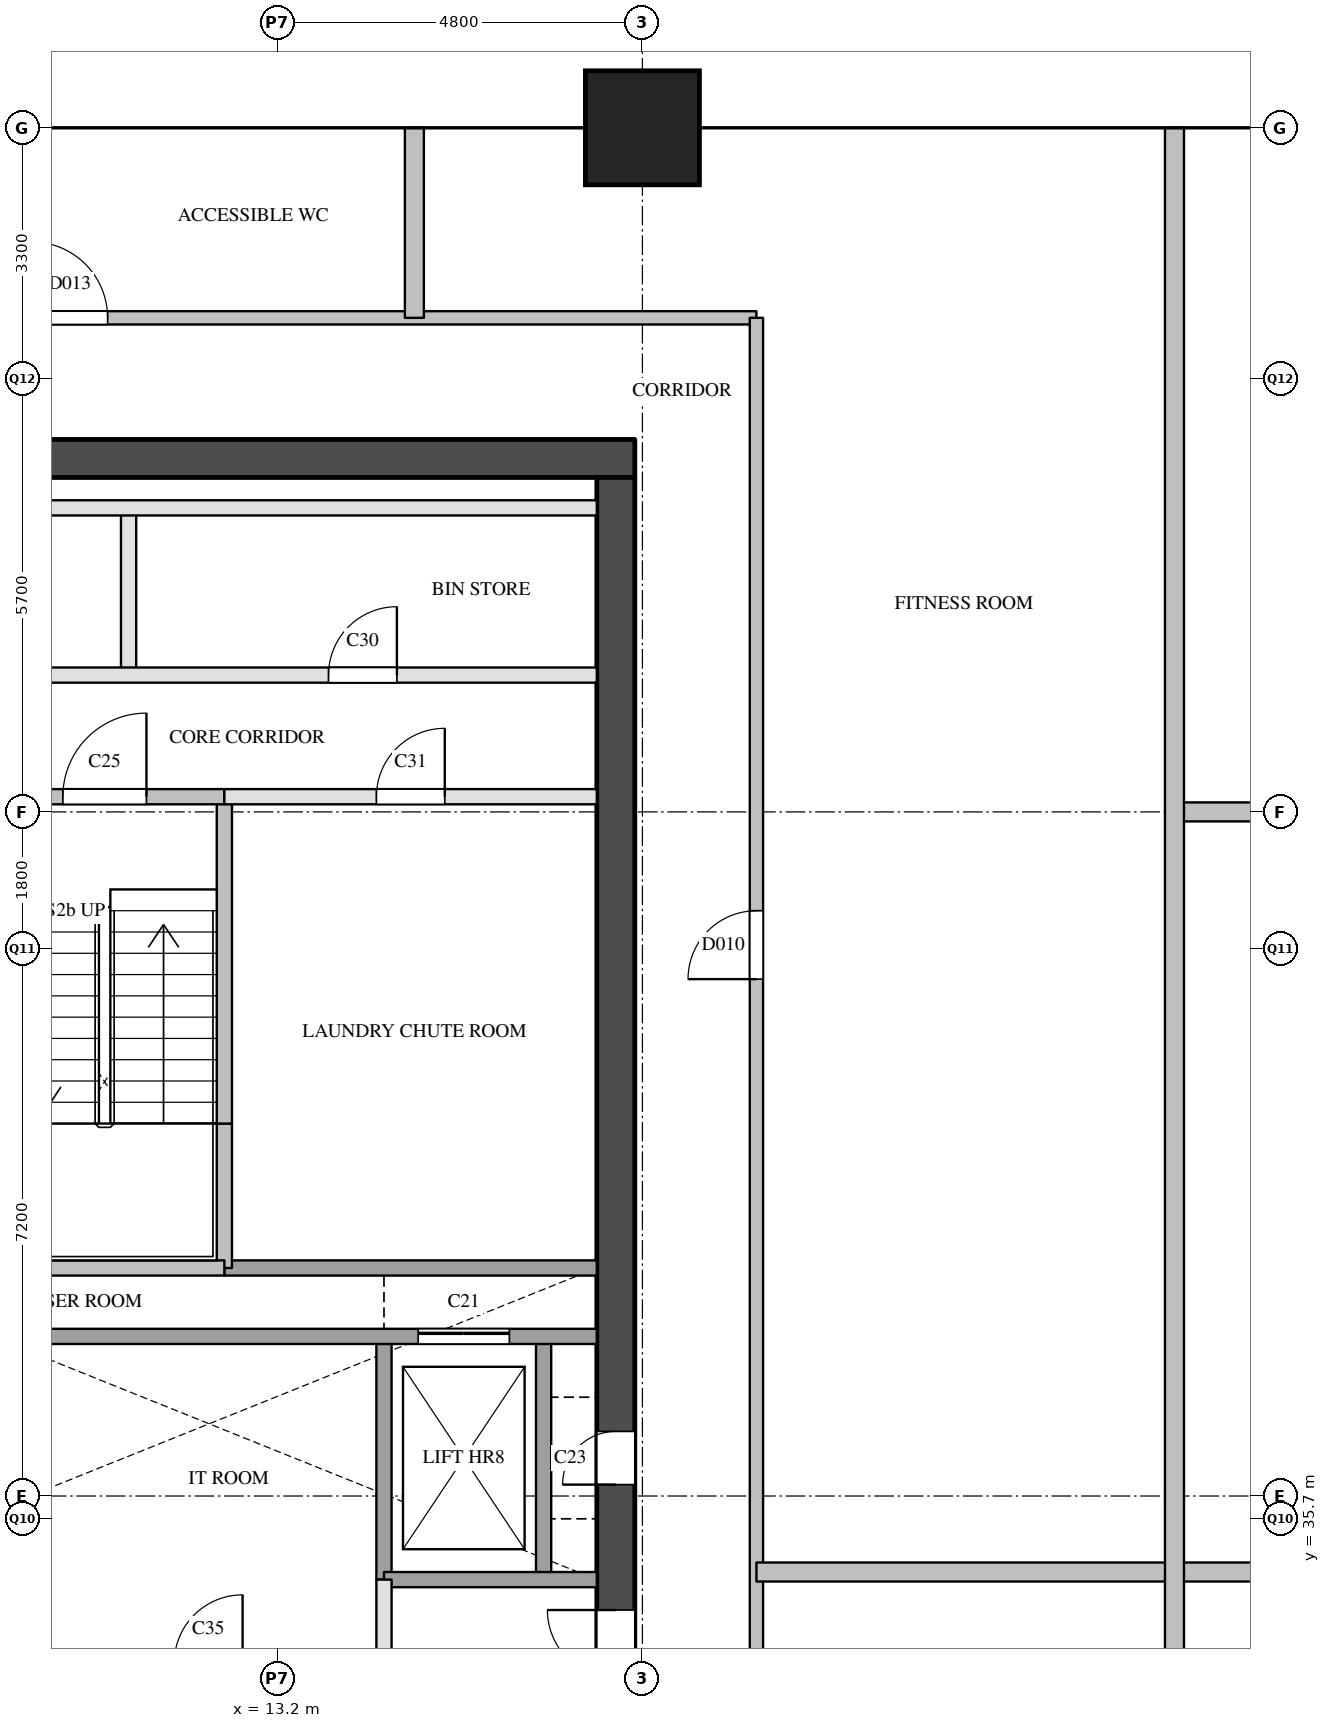
"""IFC4 building model, lengths in metres.
Left out: names, types, materials, properties, quantities, classifications, styles, units other than length and angle.
Written with IfcOpenShell. Run it as: python <this file> out.ifc"""

import sys

from ifc_helpers import new_model, si_unit, direction, frame, frame_2d, origin, origin_2d, place, context, subcontext, project, spatial, rectangle, extrude, element, fill, save


model = new_model("IFC4")
c1 = context("Model", 3, precision=1e-05, world=origin(), true_north=direction((0.0, 1.0)))
c2 = subcontext(c1, "Body", "Model", "MODEL_VIEW")
j1 = project(units=[si_unit("LENGTHUNIT", "METRE"), si_unit("PLANEANGLEUNIT", "RADIAN")], contexts=[c1])
p1 = place(None, origin())
s1 = spatial("IfcSite", under=j1, at=p1, CompositionType="ELEMENT")
p2 = place(p1, origin())
s2 = spatial("IfcBuilding", under=s1, at=p2, CompositionType="ELEMENT")
p3 = place(p2, frame((0.0, 0.0, 177.8)))
s3 = spatial("IfcBuildingStorey", under=s2, at=p3, CompositionType="ELEMENT", Elevation=177.8)
p4 = place(p3, frame((18.0, 54.0, 0.0), z_axis=(0.0, 0.0, 1.0), x_axis=(1.0, 0.0, 0.0)))
e1 = element("IfcColumn", 1, at=p4, inside=s3, PredefinedType="COLUMN", context=c2, shape_type="SweptSolid", body=[
    extrude(rectangle(XDim=1.5, YDim=1.5, at=origin_2d()), origin(), (0.0, 0.0, 1.0), 3.9),
])
p5 = place(p3, frame((5.7, 49.65, 0.0), z_axis=(0.0, 0.0, 1.0), x_axis=(1.0, 0.0, 0.0)))
e2 = element("IfcWall", 2, at=p5, inside=s3, PredefinedType="SHEAR", context=c2, shape_type="SweptSolid", body=[
    extrude(rectangle(XDim=12.2, YDim=0.5, at=frame_2d((6.1, 0.0))), origin(), (0.0, 0.0, 1.0), 3.6),
])
p6 = place(p3, frame((17.65, 29.1, 0.0), z_axis=(0.0, 0.0, 1.0), x_axis=(0.0, 1.0, 0.0)))
e3 = element("IfcWall", 3, at=p6, inside=s3, PredefinedType="SHEAR", context=c2, shape_type="SweptSolid", body=[
    extrude(rectangle(XDim=20.3, YDim=0.5, at=frame_2d((10.15, 0.0))), origin(), (0.0, 0.0, 1.0), 3.6),
])
p7 = place(p6, frame((1.25, 0.0, 0.0)))
e4 = element("IfcOpeningElement", 4, at=p7, cuts=e3, PredefinedType="OPENING", context=c2, shape_type="SweptSolid", body=[
    extrude(rectangle(XDim=0.7, YDim=2.1, at=frame_2d((0.35, 1.05))), frame((0.0, 0.26, 0.0), z_axis=(0.0, -1.0, 0.0), x_axis=(1.0, 0.0, 0.0)), (0.0, 0.0, 1.0), 0.52),
])
p8 = place(p6, frame((7.05, 0.0, 0.0)))
e5 = element("IfcOpeningElement", 5, at=p8, cuts=e3, PredefinedType="OPENING", context=c2, shape_type="SweptSolid", body=[
    extrude(rectangle(XDim=0.7, YDim=2.1, at=frame_2d((0.35, 1.05))), frame((0.0, 0.26, 0.0), z_axis=(0.0, -1.0, 0.0), x_axis=(1.0, 0.0, 0.0)), (0.0, 0.0, 1.0), 0.52),
])
p9 = place(p6, frame((3.6, 0.0, 0.0)))
e6 = element("IfcOpeningElement", 6, at=p9, cuts=e3, PredefinedType="OPENING", context=c2, shape_type="SweptSolid", body=[
    extrude(rectangle(XDim=1.8, YDim=2.1, at=frame_2d((0.9, 1.05))), frame((0.0, 0.26, 0.0), z_axis=(0.0, -1.0, 0.0), x_axis=(1.0, 0.0, 0.0)), (0.0, 0.0, 1.0), 0.52),
])
p10 = place(p3, frame((11.24, 46.8, 0.0), z_axis=(0.0, 0.0, 1.0), x_axis=(0.0, 1.0, 0.0)))
e7 = element("IfcWall", 7, at=p10, inside=s3, PredefinedType="PARTITIONING", context=c2, shape_type="SweptSolid", body=[
    extrude(rectangle(XDim=2.2, YDim=0.2, at=frame_2d((1.1, 0.0))), origin(), (0.0, 0.0, 1.0), 3.6),
])
p11 = place(p3, frame((12.5, 39.0, 0.0), z_axis=(0.0, 0.0, 1.0), x_axis=(0.0, 1.0, 0.0)))
e8 = element("IfcWall", 8, at=p11, inside=s3, PredefinedType="SOLIDWALL", context=c2, shape_type="SweptSolid", body=[
    extrude(rectangle(XDim=1.9, YDim=0.2, at=frame_2d((0.95, 0.0))), origin(), (0.0, 0.0, 1.0), 3.6),
])
p12 = place(p3, frame((12.5, 40.9, 0.0), z_axis=(0.0, 0.0, 1.0), x_axis=(0.0, 1.0, 0.0)))
e9 = element("IfcWall", 9, at=p12, inside=s3, PredefinedType="SOLIDWALL", context=c2, shape_type="SweptSolid", body=[
    extrude(rectangle(XDim=4.3, YDim=0.2, at=frame_2d((2.15, 0.0))), origin(), (0.0, 0.0, 1.0), 3.6),
])
p13 = place(p3, frame((14.6, 32.3, 0.0), z_axis=(0.0, 0.0, 1.0), x_axis=(0.0, 1.0, 0.0)))
e10 = element("IfcWall", 10, at=p13, inside=s3, PredefinedType="PARTITIONING", context=c2, shape_type="SweptSolid", body=[
    extrude(rectangle(XDim=2.6, YDim=0.2, at=frame_2d((1.3, 0.0))), origin(), (0.0, 0.0, 1.0), 3.6),
])
for number, where, z_axis, x_axis in (
    (11, (14.6, 34.9, 0.0), (0.0, 0.0, 1.0), (0.0, 1.0, 0.0)),
    (12, (16.7, 34.9, 0.0), (0.0, 0.0, 1.0), (0.0, 1.0, 0.0)),
):
    element("IfcWall", number, at=place(p3, frame(where, z_axis=z_axis, x_axis=x_axis)), inside=s3, PredefinedType="SOLIDWALL", context=c2, shape_type="SweptSolid", body=[
        extrude(rectangle(XDim=3.2, YDim=0.2, at=frame_2d((1.6, 0.0))), origin(), (0.0, 0.0, 1.0), 3.6),
    ])
p14 = place(p3, frame((14.6, 34.9, 0.0), z_axis=(0.0, 0.0, 1.0), x_axis=(1.0, 0.0, 0.0)))
e13 = element("IfcWall", 13, at=p14, inside=s3, PredefinedType="SOLIDWALL", context=c2, shape_type="SweptSolid", body=[
    extrude(rectangle(XDim=2.8, YDim=0.2, at=frame_2d((1.4, 0.0))), origin(), (0.0, 0.0, 1.0), 3.6),
])
p15 = place(p3, frame((6.2, 38.1, 0.0), z_axis=(0.0, 0.0, 1.0), x_axis=(1.0, 0.0, 0.0)))
e14 = element("IfcWall", 14, at=p15, inside=s3, PredefinedType="SOLIDWALL", context=c2, shape_type="SweptSolid", body=[
    extrude(rectangle(XDim=11.2, YDim=0.2, at=frame_2d((5.6, 0.0))), origin(), (0.0, 0.0, 1.0), 3.6),
])
p16 = place(p15, frame((8.85, 0.0, 0.0)))
e15 = element("IfcOpeningElement", 15, at=p16, cuts=e14, PredefinedType="OPENING", context=c2, shape_type="SweptSolid", body=[
    extrude(rectangle(XDim=1.2, YDim=2.1, at=frame_2d((0.6, 1.05))), frame((0.0, 0.11, 0.0), z_axis=(0.0, -1.0, 0.0), x_axis=(1.0, 0.0, 0.0)), (0.0, 0.0, 1.0), 0.22),
])
p17 = place(p3, frame((12.5, 39.0, 0.0), z_axis=(0.0, 0.0, 1.0), x_axis=(1.0, 0.0, 0.0)))
e16 = element("IfcWall", 16, at=p17, inside=s3, PredefinedType="SOLIDWALL", context=c2, shape_type="SweptSolid", body=[
    extrude(rectangle(XDim=4.9, YDim=0.2, at=frame_2d((2.45, 0.0))), origin(), (0.0, 0.0, 1.0), 3.6),
])
p18 = place(p3, frame((9.45, 39.0, 0.0), z_axis=(0.0, 0.0, 1.0), x_axis=(1.0, 0.0, 0.0)))
e17 = element("IfcWall", 17, at=p18, inside=s3, PredefinedType="SOLIDWALL", context=c2, shape_type="SweptSolid", body=[
    extrude(rectangle(XDim=3.05, YDim=0.2, at=frame_2d((1.525, 0.0))), origin(), (0.0, 0.0, 1.0), 3.6),
])
p19 = place(p3, frame((12.5, 45.2, 0.0), z_axis=(0.0, 0.0, 1.0), x_axis=(1.0, 0.0, 0.0)))
e18 = element("IfcWall", 18, at=p19, inside=s3, PredefinedType="PARTITIONING", context=c2, shape_type="SweptSolid", body=[
    extrude(rectangle(XDim=4.9, YDim=0.2, at=frame_2d((2.45, 0.0))), origin(), (0.0, 0.0, 1.0), 3.6),
])
p20 = place(p19, frame((2.0, 0.0, 0.0)))
e19 = element("IfcOpeningElement", 19, at=p20, cuts=e18, PredefinedType="OPENING", context=c2, shape_type="SweptSolid", body=[
    extrude(rectangle(XDim=0.9, YDim=2.1, at=frame_2d((0.45, 1.05))), frame((0.0, 0.11, 0.0), z_axis=(0.0, -1.0, 0.0), x_axis=(1.0, 0.0, 0.0)), (0.0, 0.0, 1.0), 0.22),
])
p21 = place(p3, frame((6.2, 45.2, 0.0), z_axis=(0.0, 0.0, 1.0), x_axis=(1.0, 0.0, 0.0)))
e20 = element("IfcWall", 20, at=p21, inside=s3, PredefinedType="SOLIDWALL", context=c2, shape_type="SweptSolid", body=[
    extrude(rectangle(XDim=6.3, YDim=0.2, at=frame_2d((3.15, 0.0))), origin(), (0.0, 0.0, 1.0), 3.6),
])
p22 = place(p21, frame((1.025, 0.0, 0.0)))
e21 = element("IfcOpeningElement", 21, at=p22, cuts=e20, PredefinedType="OPENING", context=c2, shape_type="SweptSolid", body=[
    extrude(rectangle(XDim=1.1, YDim=2.1, at=frame_2d((0.55, 1.05))), frame((0.0, 0.11, 0.0), z_axis=(0.0, -1.0, 0.0), x_axis=(1.0, 0.0, 0.0)), (0.0, 0.0, 1.0), 0.22),
])
p23 = place(p21, frame((4.175, 0.0, 0.0)))
e22 = element("IfcOpeningElement", 22, at=p23, cuts=e20, PredefinedType="OPENING", context=c2, shape_type="SweptSolid", body=[
    extrude(rectangle(XDim=1.1, YDim=2.1, at=frame_2d((0.55, 1.05))), frame((0.0, 0.11, 0.0), z_axis=(0.0, -1.0, 0.0), x_axis=(1.0, 0.0, 0.0)), (0.0, 0.0, 1.0), 0.22),
])
p24 = place(p3, frame((6.2, 46.8, 0.0), z_axis=(0.0, 0.0, 1.0), x_axis=(1.0, 0.0, 0.0)))
e23 = element("IfcWall", 23, at=p24, inside=s3, PredefinedType="PARTITIONING", context=c2, shape_type="SweptSolid", body=[
    extrude(rectangle(XDim=11.2, YDim=0.2, at=frame_2d((5.6, 0.0))), origin(), (0.0, 0.0, 1.0), 3.6),
])
p25 = place(p24, frame((2.07, 0.0, 0.0)))
e24 = element("IfcOpeningElement", 24, at=p25, cuts=e23, PredefinedType="OPENING", context=c2, shape_type="SweptSolid", body=[
    extrude(rectangle(XDim=0.9, YDim=2.1, at=frame_2d((0.45, 1.05))), frame((0.0, 0.11, 0.0), z_axis=(0.0, -1.0, 0.0), x_axis=(1.0, 0.0, 0.0)), (0.0, 0.0, 1.0), 0.22),
])
p26 = place(p24, frame((7.67, 0.0, 0.0)))
e25 = element("IfcOpeningElement", 25, at=p26, cuts=e23, PredefinedType="OPENING", context=c2, shape_type="SweptSolid", body=[
    extrude(rectangle(XDim=0.9, YDim=2.1, at=frame_2d((0.45, 1.05))), frame((0.0, 0.11, 0.0), z_axis=(0.0, -1.0, 0.0), x_axis=(1.0, 0.0, 0.0)), (0.0, 0.0, 1.0), 0.22),
])
p27 = place(p3, frame((6.2, 49.0, 0.0), z_axis=(0.0, 0.0, 1.0), x_axis=(1.0, 0.0, 0.0)))
e26 = element("IfcWall", 26, at=p27, inside=s3, PredefinedType="PARTITIONING", context=c2, shape_type="SweptSolid", body=[
    extrude(rectangle(XDim=11.2, YDim=0.2, at=frame_2d((5.6, 0.0))), origin(), (0.0, 0.0, 1.0), 3.6),
])
p28 = place(p3, frame((4.1, 51.5, 0.0), z_axis=(0.0, 0.0, 1.0), x_axis=(1.0, 0.0, 0.0)))
e27 = element("IfcWall", 27, at=p28, inside=s3, PredefinedType="PARTITIONING", context=c2, shape_type="SweptSolid", body=[
    extrude(rectangle(XDim=15.4, YDim=0.175, at=frame_2d((7.7, 0.0))), origin(), (0.0, 0.0, 1.0), 3.6),
])
p29 = place(p28, frame((5.864, 0.0, 0.0)))
e28 = element("IfcOpeningElement", 28, at=p29, cuts=e27, PredefinedType="OPENING", context=c2, shape_type="SweptSolid", body=[
    extrude(rectangle(XDim=1.0, YDim=2.1, at=frame_2d((0.5, 1.05))), frame((0.0, 0.097, 0.0), z_axis=(0.0, -1.0, 0.0), x_axis=(1.0, 0.0, 0.0)), (0.0, 0.0, 1.0), 0.195),
])
p30 = place(p3, frame((19.5, 28.5, 0.0), z_axis=(0.0, 0.0, 1.0), x_axis=(0.0, 1.0, 0.0)))
e29 = element("IfcWall", 29, at=p30, inside=s3, PredefinedType="PARTITIONING", context=c2, shape_type="SweptSolid", body=[
    extrude(rectangle(XDim=23.0, YDim=0.175, at=frame_2d((11.5, 0.0))), origin(), (0.0, 0.0, 1.0), 3.6),
])
p31 = place(p30, frame((14.3, 0.0, 0.0)))
e30 = element("IfcOpeningElement", 30, at=p31, cuts=e29, PredefinedType="OPENING", context=c2, shape_type="SweptSolid", body=[
    extrude(rectangle(XDim=0.9, YDim=2.1, at=frame_2d((0.45, 1.05))), frame((0.0, 0.097, 0.0), z_axis=(0.0, -1.0, 0.0), x_axis=(1.0, 0.0, 0.0)), (0.0, 0.0, 1.0), 0.195),
])
p32 = place(p3, frame((19.5, 35.0, 0.0), z_axis=(0.0, 0.0, 1.0), x_axis=(1.0, 0.0, 0.0)))
e31 = element("IfcWall", 31, at=p32, inside=s3, PredefinedType="PARTITIONING", context=c2, shape_type="SweptSolid", body=[
    extrude(rectangle(XDim=15.0, YDim=0.25, at=frame_2d((7.5, 0.0))), origin(), (0.0, 0.0, 1.0), 2.6),
])
p33 = place(p3, frame((25.0, 45.0, 0.0), z_axis=(0.0, 0.0, 1.0), x_axis=(1.0, 0.0, 0.0)))
e32 = element("IfcWall", 32, at=p33, inside=s3, PredefinedType="PARTITIONING", context=c2, shape_type="SweptSolid", body=[
    extrude(rectangle(XDim=9.5, YDim=0.25, at=frame_2d((4.75, 0.0))), origin(), (0.0, 0.0, 1.0), 3.6),
])
p34 = place(p3, frame((15.0, 51.5, 0.0), z_axis=(0.0, 0.0, 1.0), x_axis=(0.0, 1.0, 0.0)))
e33 = element("IfcWall", 33, at=p34, inside=s3, PredefinedType="PARTITIONING", context=c2, shape_type="SweptSolid", body=[
    extrude(rectangle(XDim=2.5, YDim=0.25, at=frame_2d((1.25, 0.0))), origin(), (0.0, 0.0, 1.0), 2.6),
])
p35 = place(p3, frame((25.0, 27.0, 0.0), z_axis=(0.0, 0.0, 1.0), x_axis=(0.0, 1.0, 0.0)))
e34 = element("IfcWall", 34, at=p35, inside=s3, PredefinedType="PARTITIONING", context=c2, shape_type="SweptSolid", body=[
    extrude(rectangle(XDim=27.0, YDim=0.25, at=frame_2d((13.5, 0.0))), origin(), (0.0, 0.0, 1.0), 2.6),
])
p36 = place(p16, origin())
e35 = element("IfcDoor", 35, at=p36, inside=s3, OperationType="SLIDING_TO_LEFT", PredefinedType="DOOR", context=c2, shape_type="SweptSolid", body=[
    extrude(rectangle(XDim=1.2, YDim=2.1, at=frame_2d((0.6, 1.05))), frame((0.0, 0.025, 0.0), z_axis=(0.0, -1.0, 0.0), x_axis=(1.0, 0.0, 0.0)), (0.0, 0.0, 1.0), 0.05),
])
fill(e15, e35)
p37 = place(p8, origin())
e36 = element("IfcDoor", 36, at=p37, inside=s3, OperationType="SINGLE_SWING_LEFT", PredefinedType="DOOR", context=c2, shape_type="SweptSolid", body=[
    extrude(rectangle(XDim=0.7, YDim=2.1, at=frame_2d((0.35, 1.05))), frame((0.0, 0.025, 0.0), z_axis=(0.0, -1.0, 0.0), x_axis=(1.0, 0.0, 0.0)), (0.0, 0.0, 1.0), 0.05),
])
fill(e5, e36)
p38 = place(p23, origin())
e37 = element("IfcDoor", 37, at=p38, inside=s3, OperationType="SINGLE_SWING_RIGHT", PredefinedType="DOOR", context=c2, shape_type="SweptSolid", body=[
    extrude(rectangle(XDim=1.1, YDim=2.1, at=frame_2d((0.55, 1.05))), frame((0.0, 0.025, 0.0), z_axis=(0.0, -1.0, 0.0), x_axis=(1.0, 0.0, 0.0)), (0.0, 0.0, 1.0), 0.05),
])
fill(e22, e37)
p39 = place(p9, origin())
e38 = element("IfcDoor", 38, at=p39, inside=s3, OperationType="DOUBLE_DOOR_SINGLE_SWING", PredefinedType="DOOR", context=c2, shape_type="SweptSolid", body=[
    extrude(rectangle(XDim=1.8, YDim=2.1, at=frame_2d((0.9, 1.05))), frame((0.0, 0.025, 0.0), z_axis=(0.0, -1.0, 0.0), x_axis=(1.0, 0.0, 0.0)), (0.0, 0.0, 1.0), 0.05),
])
fill(e6, e38)
p40 = place(p26, origin())
e39 = element("IfcDoor", 39, at=p40, inside=s3, OperationType="SINGLE_SWING_RIGHT", PredefinedType="DOOR", context=c2, shape_type="SweptSolid", body=[
    extrude(rectangle(XDim=0.9, YDim=2.1, at=frame_2d((0.45, 1.05))), frame((0.0, 0.025, 0.0), z_axis=(0.0, -1.0, 0.0), x_axis=(1.0, 0.0, 0.0)), (0.0, 0.0, 1.0), 0.05),
])
fill(e25, e39)
p41 = place(p20, origin())
e40 = element("IfcDoor", 40, at=p41, inside=s3, OperationType="SINGLE_SWING_RIGHT", PredefinedType="DOOR", context=c2, shape_type="SweptSolid", body=[
    extrude(rectangle(XDim=0.9, YDim=2.1, at=frame_2d((0.45, 1.05))), frame((0.0, 0.025, 0.0), z_axis=(0.0, -1.0, 0.0), x_axis=(1.0, 0.0, 0.0)), (0.0, 0.0, 1.0), 0.05),
])
fill(e19, e40)
p42 = place(p31, origin())
e41 = element("IfcDoor", 41, at=p42, inside=s3, OperationType="SINGLE_SWING_LEFT", PredefinedType="DOOR", context=c2, shape_type="SweptSolid", body=[
    extrude(rectangle(XDim=0.9, YDim=2.1, at=frame_2d((0.45, 1.05))), frame((0.0, 0.025, 0.0), z_axis=(0.0, -1.0, 0.0), x_axis=(1.0, 0.0, 0.0)), (0.0, 0.0, 1.0), 0.05),
])
fill(e30, e41)
p43 = place(p29, origin())
e42 = element("IfcDoor", 42, at=p43, inside=s3, OperationType="SINGLE_SWING_LEFT", PredefinedType="DOOR", context=c2, shape_type="SweptSolid", body=[
    extrude(rectangle(XDim=1.0, YDim=2.1, at=frame_2d((0.5, 1.05))), frame((0.0, 0.025, 0.0), z_axis=(0.0, -1.0, 0.0), x_axis=(1.0, 0.0, 0.0)), (0.0, 0.0, 1.0), 0.05),
])
fill(e28, e42)
save(model, sys.argv[1])
